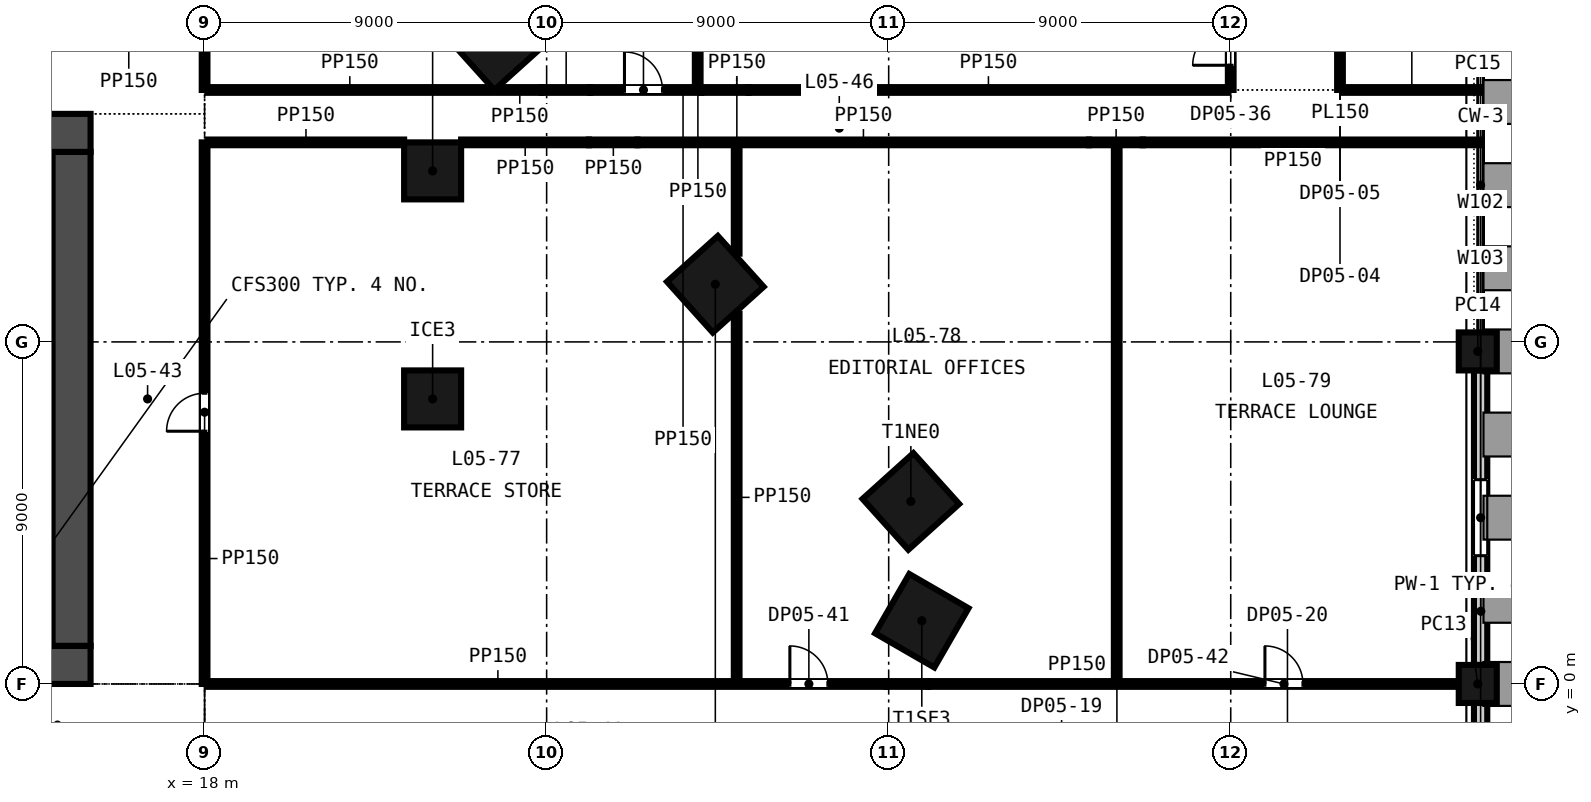
"""IFC4 building model, lengths in metres.
Left out: names, types, materials, properties, quantities, classifications, styles, units other than length and angle.
Written with IfcOpenShell. Run it as: python <this file> out.ifc"""

import sys

from ifc_helpers import new_model, si_unit, direction, frame, frame_2d, origin, origin_2d, place, context, subcontext, project, spatial, rectangle, extrude, element, fill, save


model = new_model("IFC4")
c1 = context("Model", 3, precision=1e-05, world=origin(), true_north=direction((0.0, 1.0)))
c2 = subcontext(c1, "Body", "Model", "MODEL_VIEW")
j1 = project(units=[si_unit("LENGTHUNIT", "METRE"), si_unit("PLANEANGLEUNIT", "RADIAN")], contexts=[c1])
p1 = place(None, origin())
s1 = spatial("IfcSite", under=j1, at=p1, CompositionType="ELEMENT")
p2 = place(p1, origin())
s2 = spatial("IfcBuilding", under=s1, at=p2, CompositionType="ELEMENT")
p3 = place(p2, frame((0.0, 0.0, 31.5)))
s3 = spatial("IfcBuildingStorey", under=s2, at=p3, CompositionType="ELEMENT", Elevation=31.5)
p4 = place(p3, frame((-15.0, 0.5, -0.3), z_axis=(0.0, 0.0, 1.0), x_axis=(1.0, 0.0, 0.0)))
e1 = element("IfcWall", 1, at=p4, inside=s3, PredefinedType="SOLIDWALL", context=c2, shape_type="SweptSolid", body=[
    extrude(rectangle(XDim=30.0, YDim=1.0, at=frame_2d((15.0, 0.0))), origin(), (0.0, 0.0, 1.0), 4.65),
])
p5 = place(p4, frame((5.8, 0.0, 0.3)))
e2 = element("IfcOpeningElement", 2, at=p5, cuts=e1, PredefinedType="OPENING", context=c2, shape_type="SweptSolid", body=[
    extrude(rectangle(XDim=2.4, YDim=2.4, at=frame_2d((1.2, 1.2))), frame((0.0, 0.51, 0.0), z_axis=(0.0, -1.0, 0.0), x_axis=(1.0, 0.0, 0.0)), (0.0, 0.0, 1.0), 1.02),
])
p6 = place(p4, frame((13.8, 0.0, 0.3)))
e3 = element("IfcOpeningElement", 3, at=p6, cuts=e1, PredefinedType="OPENING", context=c2, shape_type="SweptSolid", body=[
    extrude(rectangle(XDim=2.4, YDim=2.4, at=frame_2d((1.2, 1.2))), frame((0.0, 0.51, 0.0), z_axis=(0.0, -1.0, 0.0), x_axis=(1.0, 0.0, 0.0)), (0.0, 0.0, 1.0), 1.02),
])
p7 = place(p4, frame((21.8, 0.0, 0.3)))
e4 = element("IfcOpeningElement", 4, at=p7, cuts=e1, PredefinedType="OPENING", context=c2, shape_type="SweptSolid", body=[
    extrude(rectangle(XDim=2.4, YDim=2.4, at=frame_2d((1.2, 1.2))), frame((0.0, 0.51, 0.0), z_axis=(0.0, -1.0, 0.0), x_axis=(1.0, 0.0, 0.0)), (0.0, 0.0, 1.0), 1.02),
])
p8 = place(p4, frame((1.5, 0.0, 0.3)))
e5 = element("IfcOpeningElement", 5, at=p8, cuts=e1, PredefinedType="OPENING", context=c2, shape_type="SweptSolid", body=[
    extrude(rectangle(XDim=1.2, YDim=2.1, at=frame_2d((0.6, 1.05))), frame((0.0, 0.51, 0.0), z_axis=(0.0, -1.0, 0.0), x_axis=(1.0, 0.0, 0.0)), (0.0, 0.0, 1.0), 1.02),
])
p9 = place(p4, frame((27.3, 0.0, 0.3)))
e6 = element("IfcOpeningElement", 6, at=p9, cuts=e1, PredefinedType="OPENING", context=c2, shape_type="SweptSolid", body=[
    extrude(rectangle(XDim=1.2, YDim=2.1, at=frame_2d((0.6, 1.05))), frame((0.0, 0.51, 0.0), z_axis=(0.0, -1.0, 0.0), x_axis=(1.0, 0.0, 0.0)), (0.0, 0.0, 1.0), 1.02),
])
p10 = place(p3, frame((-15.0, 14.5, -0.3), z_axis=(0.0, 0.0, 1.0), x_axis=(1.0, 0.0, 0.0)))
e7 = element("IfcWall", 7, at=p10, inside=s3, PredefinedType="SOLIDWALL", context=c2, shape_type="SweptSolid", body=[
    extrude(rectangle(XDim=30.0, YDim=1.0, at=frame_2d((15.0, 0.0))), origin(), (0.0, 0.0, 1.0), 4.65),
])
p11 = place(p10, frame((9.25, 0.0, 0.3)))
e8 = element("IfcOpeningElement", 8, at=p11, cuts=e7, PredefinedType="OPENING", context=c2, shape_type="SweptSolid", body=[
    extrude(rectangle(XDim=1.5, YDim=2.1, at=frame_2d((0.75, 1.05))), frame((0.0, 0.51, 0.0), z_axis=(0.0, -1.0, 0.0), x_axis=(1.0, 0.0, 0.0)), (0.0, 0.0, 1.0), 1.02),
])
p12 = place(p10, frame((19.4, 0.0, 0.3)))
e9 = element("IfcOpeningElement", 9, at=p12, cuts=e7, PredefinedType="OPENING", context=c2, shape_type="SweptSolid", body=[
    extrude(rectangle(XDim=1.5, YDim=2.1, at=frame_2d((0.75, 1.05))), frame((0.0, 0.51, 0.0), z_axis=(0.0, -1.0, 0.0), x_axis=(1.0, 0.0, 0.0)), (0.0, 0.0, 1.0), 1.02),
])
p13 = place(p10, frame((1.5, 0.0, 0.3)))
e10 = element("IfcOpeningElement", 10, at=p13, cuts=e7, PredefinedType="OPENING", context=c2, shape_type="SweptSolid", body=[
    extrude(rectangle(XDim=1.2, YDim=2.1, at=frame_2d((0.6, 1.05))), frame((0.0, 0.51, 0.0), z_axis=(0.0, -1.0, 0.0), x_axis=(1.0, 0.0, 0.0)), (0.0, 0.0, 1.0), 1.02),
])
p14 = place(p10, frame((27.3, 0.0, 0.3)))
e11 = element("IfcOpeningElement", 11, at=p14, cuts=e7, PredefinedType="OPENING", context=c2, shape_type="SweptSolid", body=[
    extrude(rectangle(XDim=1.2, YDim=2.1, at=frame_2d((0.6, 1.05))), frame((0.0, 0.51, 0.0), z_axis=(0.0, -1.0, 0.0), x_axis=(1.0, 0.0, 0.0)), (0.0, 0.0, 1.0), 1.02),
])
p15 = place(p3, frame((14.5, 1.0, -0.3), z_axis=(0.0, 0.0, 1.0), x_axis=(0.0, 1.0, 0.0)))
e12 = element("IfcWall", 12, at=p15, inside=s3, PredefinedType="SOLIDWALL", context=c2, shape_type="SweptSolid", body=[
    extrude(rectangle(XDim=13.0, YDim=1.0, at=frame_2d((6.5, 0.0))), origin(), (0.0, 0.0, 1.0), 4.65),
])
for number, where, z_axis, x_axis in (
    (13, (36.872, 1.663, -0.3), (0.0, 0.0, 1.0), (0.5, 0.866, 0.0)),
    (14, (36.584, 4.803, -0.3), (0.0, 0.0, 1.0), (-0.669, 0.743, 0.0)),
    (15, (31.438, 10.517, -0.3), (0.0, 0.0, 1.0), (-0.669, 0.743, 0.0)),
    (16, (25.691, 16.9, -0.3), (0.0, 0.0, 1.0), (-0.669, 0.743, 0.0)),
):
    element("IfcColumn", number, at=place(p3, frame(where, z_axis=z_axis, x_axis=x_axis)), inside=s3, PredefinedType="COLUMN", context=c2, shape_type="SweptSolid", body=[
        extrude(rectangle(XDim=1.8, YDim=1.8, at=origin_2d()), origin(), (0.0, 0.0, 1.0), 4.65),
    ])
for number, where, z_axis, x_axis in (
    (17, (24.0, 7.5, -0.3), (0.0, 0.0, 1.0), (1.0, 0.0, 0.0)),
    (18, (24.0, 13.5, -0.3), (0.0, 0.0, 1.0), (1.0, 0.0, 0.0)),
):
    element("IfcColumn", number, at=place(p3, frame(where, z_axis=z_axis, x_axis=x_axis)), inside=s3, PredefinedType="COLUMN", context=c2, shape_type="SweptSolid", body=[
        extrude(rectangle(XDim=1.5, YDim=1.5, at=origin_2d()), origin(), (0.0, 0.0, 1.0), 4.65),
    ])
for number, where, z_axis, x_axis in (
    (19, (51.5, 0.0, -0.3), (0.0, 0.0, 1.0), (0.0, 1.0, 0.0)),
    (20, (51.5, 8.75, -0.3), (0.0, 0.0, 1.0), (0.0, 1.0, 0.0)),
):
    element("IfcColumn", number, at=place(p3, frame(where, z_axis=z_axis, x_axis=x_axis)), inside=s3, PredefinedType="COLUMN", context=c2, shape_type="SweptSolid", body=[
        extrude(rectangle(XDim=1.0, YDim=1.0, at=origin_2d()), origin(), (0.0, 0.0, 1.0), 4.65),
    ])
p16 = place(p3, frame((51.575, -8.2, -0.3), z_axis=(0.0, 0.0, 1.0), x_axis=(0.0, 1.0, 0.0)))
e21 = element("IfcWall", 21, at=p16, inside=s3, PredefinedType="SOLIDWALL", context=c2, shape_type="SweptSolid", body=[
    extrude(rectangle(XDim=7.7, YDim=0.35, at=frame_2d((3.85, 0.0))), origin(), (0.0, 0.0, 1.0), 3.75),
])
p17 = place(p16, frame((2.85, 0.0, 1.2)))
e22 = element("IfcOpeningElement", 22, at=p17, cuts=e21, PredefinedType="OPENING", context=c2, shape_type="SweptSolid", body=[
    extrude(rectangle(XDim=2.0, YDim=2.5, at=frame_2d((1.0, 1.25))), frame((0.0, 0.185, 0.0), z_axis=(0.0, -1.0, 0.0), x_axis=(1.0, 0.0, 0.0)), (0.0, 0.0, 1.0), 0.37),
])
p18 = place(p3, frame((51.575, 0.5, -0.3), z_axis=(0.0, 0.0, 1.0), x_axis=(0.0, 1.0, 0.0)))
e23 = element("IfcWall", 23, at=p18, inside=s3, PredefinedType="SOLIDWALL", context=c2, shape_type="SweptSolid", body=[
    extrude(rectangle(XDim=7.75, YDim=0.35, at=frame_2d((3.875, 0.0))), origin(), (0.0, 0.0, 1.0), 3.75),
])
p19 = place(p18, frame((2.875, 0.0, 1.2)))
e24 = element("IfcOpeningElement", 24, at=p19, cuts=e23, PredefinedType="OPENING", context=c2, shape_type="SweptSolid", body=[
    extrude(rectangle(XDim=2.0, YDim=2.5, at=frame_2d((1.0, 1.25))), frame((0.0, 0.185, 0.0), z_axis=(0.0, -1.0, 0.0), x_axis=(1.0, 0.0, 0.0)), (0.0, 0.0, 1.0), 0.37),
])
p20 = place(p3, frame((11.05, 7.35, -0.3), z_axis=(0.0, 0.0, 1.0), x_axis=(1.0, 0.0, 0.0)))
e25 = element("IfcWall", 25, at=p20, inside=s3, PredefinedType="SOLIDWALL", context=c2, shape_type="SweptSolid", body=[
    extrude(rectangle(XDim=2.95, YDim=0.3, at=frame_2d((1.475, 0.0))), origin(), (0.0, 0.0, 1.0), 4.65),
])
p21 = place(p3, frame((18.075, 0.0, 0.0), z_axis=(0.0, 0.0, 1.0), x_axis=(1.0, 0.0, 0.0)))
e26 = element("IfcWall", 26, at=p21, inside=s3, PredefinedType="PARTITIONING", context=c2, shape_type="SweptSolid", body=[
    extrude(rectangle(XDim=17.865, YDim=0.15, at=frame_2d((8.933, 0.0))), origin(), (0.0, 0.0, 1.0), 4.35),
])
p22 = place(p21, frame((15.325, 0.0, 0.0)))
e27 = element("IfcOpeningElement", 27, at=p22, cuts=e26, PredefinedType="OPENING", context=c2, shape_type="SweptSolid", body=[
    extrude(rectangle(XDim=1.0, YDim=2.1, at=frame_2d((0.5, 1.05))), frame((0.0, 0.085, 0.0), z_axis=(0.0, -1.0, 0.0), x_axis=(1.0, 0.0, 0.0)), (0.0, 0.0, 1.0), 0.17),
])
p23 = place(p3, frame((35.94, 0.0, 0.0), z_axis=(0.0, 0.0, 1.0), x_axis=(1.0, 0.0, 0.0)))
e28 = element("IfcWall", 28, at=p23, inside=s3, PredefinedType="PARTITIONING", context=c2, shape_type="SweptSolid", body=[
    extrude(rectangle(XDim=1.097, YDim=0.15, at=frame_2d((0.548, 0.0))), origin(), (0.0, 0.0, 1.0), 3.5),
])
p24 = place(p3, frame((37.037, 0.0, 0.0), z_axis=(0.0, 0.0, 1.0), x_axis=(1.0, 0.0, 0.0)))
e29 = element("IfcWall", 29, at=p24, inside=s3, PredefinedType="PARTITIONING", context=c2, shape_type="SweptSolid", body=[
    extrude(rectangle(XDim=13.963, YDim=0.15, at=frame_2d((6.981, 0.0))), origin(), (0.0, 0.0, 1.0), 4.35),
])
p25 = place(p24, frame((8.863, 0.0, 0.0)))
e30 = element("IfcOpeningElement", 30, at=p25, cuts=e29, PredefinedType="OPENING", context=c2, shape_type="SweptSolid", body=[
    extrude(rectangle(XDim=1.0, YDim=2.1, at=frame_2d((0.5, 1.05))), frame((0.0, 0.085, 0.0), z_axis=(0.0, -1.0, 0.0), x_axis=(1.0, 0.0, 0.0)), (0.0, 0.0, 1.0), 0.17),
])
p26 = place(p3, frame((18.075, 14.25, 0.0), z_axis=(0.0, 0.0, 1.0), x_axis=(1.0, 0.0, 0.0)))
e31 = element("IfcWall", 31, at=p26, inside=s3, PredefinedType="PARTITIONING", context=c2, shape_type="SweptSolid", body=[
    extrude(rectangle(XDim=5.175, YDim=0.15, at=frame_2d((2.587, 0.0))), origin(), (0.0, 0.0, 1.0), 4.35),
])
p27 = place(p3, frame((24.75, 14.25, 0.0), z_axis=(0.0, 0.0, 1.0), x_axis=(1.0, 0.0, 0.0)))
e32 = element("IfcWall", 32, at=p27, inside=s3, PredefinedType="PARTITIONING", context=c2, shape_type="SweptSolid", body=[
    extrude(rectangle(XDim=3.361, YDim=0.15, at=frame_2d((1.681, 0.0))), origin(), (0.0, 0.0, 1.0), 4.35),
])
p28 = place(p3, frame((28.111, 14.25, 0.0), z_axis=(0.0, 0.0, 1.0), x_axis=(1.0, 0.0, 0.0)))
e33 = element("IfcWall", 33, at=p28, inside=s3, PredefinedType="PARTITIONING", context=c2, shape_type="SweptSolid", body=[
    extrude(rectangle(XDim=1.278, YDim=0.15, at=frame_2d((0.639, 0.0))), origin(), (0.0, 0.0, 1.0), 3.5),
])
p29 = place(p3, frame((29.389, 14.25, 0.0), z_axis=(0.0, 0.0, 1.0), x_axis=(1.0, 0.0, 0.0)))
e34 = element("IfcWall", 34, at=p29, inside=s3, PredefinedType="PARTITIONING", context=c2, shape_type="SweptSolid", body=[
    extrude(rectangle(XDim=11.882, YDim=0.15, at=frame_2d((5.941, 0.0))), origin(), (0.0, 0.0, 1.0), 4.35),
])
p30 = place(p3, frame((41.272, 14.25, 0.0), z_axis=(0.0, 0.0, 1.0), x_axis=(1.0, 0.0, 0.0)))
e35 = element("IfcWall", 35, at=p30, inside=s3, PredefinedType="PARTITIONING", context=c2, shape_type="SweptSolid", body=[
    extrude(rectangle(XDim=1.415, YDim=0.15, at=frame_2d((0.708, 0.0))), origin(), (0.0, 0.0, 1.0), 3.436),
])
p31 = place(p3, frame((42.687, 14.25, 0.0), z_axis=(0.0, 0.0, 1.0), x_axis=(1.0, 0.0, 0.0)))
e36 = element("IfcWall", 36, at=p31, inside=s3, PredefinedType="PARTITIONING", context=c2, shape_type="SweptSolid", body=[
    extrude(rectangle(XDim=8.884, YDim=0.15, at=frame_2d((4.442, 0.0))), origin(), (0.0, 0.0, 1.0), 4.35),
])
p32 = place(p3, frame((18.075, 15.629, 0.0), z_axis=(0.0, 0.0, 1.0), x_axis=(1.0, 0.0, 0.0)))
e37 = element("IfcWall", 37, at=p32, inside=s3, PredefinedType="PARTITIONING", context=c2, shape_type="SweptSolid", body=[
    extrude(rectangle(XDim=7.482, YDim=0.15, at=frame_2d((3.741, 0.0))), origin(), (0.0, 0.0, 1.0), 4.35),
])
p33 = place(p3, frame((25.708, 15.629, 0.0), z_axis=(0.0, 0.0, 1.0), x_axis=(1.0, 0.0, 0.0)))
e38 = element("IfcWall", 38, at=p33, inside=s3, PredefinedType="PARTITIONING", context=c2, shape_type="SweptSolid", body=[
    extrude(rectangle(XDim=1.162, YDim=0.15, at=frame_2d((0.581, 0.0))), origin(), (0.0, 0.0, 1.0), 4.35),
])
p34 = place(p3, frame((26.869, 15.629, 0.0), z_axis=(0.0, 0.0, 1.0), x_axis=(1.0, 0.0, 0.0)))
e39 = element("IfcWall", 39, at=p34, inside=s3, PredefinedType="PARTITIONING", context=c2, shape_type="SweptSolid", body=[
    extrude(rectangle(XDim=1.278, YDim=0.15, at=frame_2d((0.639, 0.0))), origin(), (0.0, 0.0, 1.0), 3.5),
])
p35 = place(p3, frame((28.148, 15.629, 0.0), z_axis=(0.0, 0.0, 1.0), x_axis=(1.0, 0.0, 0.0)))
e40 = element("IfcWall", 40, at=p35, inside=s3, PredefinedType="PARTITIONING", context=c2, shape_type="SweptSolid", body=[
    extrude(rectangle(XDim=2.923, YDim=0.15, at=frame_2d((1.461, 0.0))), origin(), (0.0, 0.0, 1.0), 4.35),
])
p36 = place(p35, frame((0.9, 0.0, 0.0)))
e41 = element("IfcOpeningElement", 41, at=p36, cuts=e40, PredefinedType="OPENING", context=c2, shape_type="SweptSolid", body=[
    extrude(rectangle(XDim=1.0, YDim=2.1, at=frame_2d((0.5, 1.05))), frame((0.0, 0.085, 0.0), z_axis=(0.0, -1.0, 0.0), x_axis=(1.0, 0.0, 0.0)), (0.0, 0.0, 1.0), 0.17),
])
p37 = place(p3, frame((31.071, 15.629, 0.0), z_axis=(0.0, 0.0, 1.0), x_axis=(1.0, 0.0, 0.0)))
e42 = element("IfcWall", 42, at=p37, inside=s3, PredefinedType="PARTITIONING", context=c2, shape_type="SweptSolid", body=[
    extrude(rectangle(XDim=1.243, YDim=0.15, at=frame_2d((0.622, 0.0))), origin(), (0.0, 0.0, 1.0), 3.261),
])
p38 = place(p3, frame((32.314, 15.629, 0.0), z_axis=(0.0, 0.0, 1.0), x_axis=(1.0, 0.0, 0.0)))
e43 = element("IfcWall", 43, at=p38, inside=s3, PredefinedType="PARTITIONING", context=c2, shape_type="SweptSolid", body=[
    extrude(rectangle(XDim=12.611, YDim=0.15, at=frame_2d((6.305, 0.0))), origin(), (0.0, 0.0, 1.0), 4.35),
])
p39 = place(p3, frame((47.95, 15.629, 0.0), z_axis=(0.0, 0.0, 1.0), x_axis=(1.0, 0.0, 0.0)))
e44 = element("IfcWall", 44, at=p39, inside=s3, PredefinedType="PARTITIONING", context=c2, shape_type="SweptSolid", body=[
    extrude(rectangle(XDim=3.62, YDim=0.15, at=frame_2d((1.81, 0.0))), origin(), (0.0, 0.0, 1.0), 4.35),
])
p40 = place(p3, frame((18.0, 0.0, 0.0), z_axis=(0.0, 0.0, 1.0), x_axis=(0.0, 1.0, 0.0)))
e45 = element("IfcWall", 45, at=p40, inside=s3, PredefinedType="PARTITIONING", context=c2, shape_type="SweptSolid", body=[
    extrude(rectangle(XDim=14.25, YDim=0.15, at=frame_2d((7.125, 0.0))), origin(), (0.0, 0.0, 1.0), 4.35),
])
p41 = place(p40, frame((6.65, 0.0, 0.0)))
e46 = element("IfcOpeningElement", 46, at=p41, cuts=e45, PredefinedType="OPENING", context=c2, shape_type="SweptSolid", body=[
    extrude(rectangle(XDim=1.0, YDim=2.1, at=frame_2d((0.5, 1.05))), frame((0.0, 0.085, 0.0), z_axis=(0.0, -1.0, 0.0), x_axis=(1.0, 0.0, 0.0)), (0.0, 0.0, 1.0), 0.17),
])
p42 = place(p3, frame((18.0, 15.629, 0.0), z_axis=(0.0, 0.0, 1.0), x_axis=(0.0, 1.0, 0.0)))
e47 = element("IfcWall", 47, at=p42, inside=s3, PredefinedType="PARTITIONING", context=c2, shape_type="SweptSolid", body=[
    extrude(rectangle(XDim=9.85, YDim=0.15, at=frame_2d((4.925, 0.0))), origin(), (0.0, 0.0, 1.0), 4.35),
])
p43 = place(p3, frame((32.0, 0.075, 0.0), z_axis=(0.0, 0.0, 1.0), x_axis=(0.0, 1.0, 0.0)))
e48 = element("IfcWall", 48, at=p43, inside=s3, PredefinedType="PARTITIONING", context=c2, shape_type="SweptSolid", body=[
    extrude(rectangle(XDim=9.669, YDim=0.15, at=frame_2d((4.834, 0.0))), origin(), (0.0, 0.0, 1.0), 4.35),
])
p44 = place(p3, frame((32.0, 11.322, 0.0), z_axis=(0.0, 0.0, 1.0), x_axis=(0.0, 1.0, 0.0)))
e49 = element("IfcWall", 49, at=p44, inside=s3, PredefinedType="PARTITIONING", context=c2, shape_type="SweptSolid", body=[
    extrude(rectangle(XDim=2.853, YDim=0.15, at=frame_2d((1.427, 0.0))), origin(), (0.0, 0.0, 1.0), 4.35),
])
p45 = place(p3, frame((30.975, 15.704, 0.0), z_axis=(0.0, 0.0, 1.0), x_axis=(0.0, 1.0, 0.0)))
e50 = element("IfcWall", 50, at=p45, inside=s3, PredefinedType="PARTITIONING", context=c2, shape_type="SweptSolid", body=[
    extrude(rectangle(XDim=4.493, YDim=0.15, at=frame_2d((2.246, 0.0))), origin(), (0.0, 0.0, 1.0), 4.35),
])
p46 = place(p3, frame((42.0, 0.075, 0.0), z_axis=(0.0, 0.0, 1.0), x_axis=(0.0, 1.0, 0.0)))
e51 = element("IfcWall", 51, at=p46, inside=s3, PredefinedType="PARTITIONING", context=c2, shape_type="SweptSolid", body=[
    extrude(rectangle(XDim=14.1, YDim=0.15, at=frame_2d((7.05, 0.0))), origin(), (0.0, 0.0, 1.0), 4.35),
])
p47 = place(p3, frame((45.0, 15.629, 0.0), z_axis=(0.0, 0.0, 1.0), x_axis=(0.0, 1.0, 0.0)))
e52 = element("IfcWall", 52, at=p47, inside=s3, PredefinedType="PARTITIONING", context=c2, shape_type="SweptSolid", body=[
    extrude(rectangle(XDim=6.062, YDim=0.15, at=frame_2d((3.031, 0.0))), origin(), (0.0, 0.0, 1.0), 4.35),
])
p48 = place(p47, frame((0.65, 0.0, 0.0)))
e53 = element("IfcOpeningElement", 53, at=p48, cuts=e52, PredefinedType="OPENING", context=c2, shape_type="SweptSolid", body=[
    extrude(rectangle(XDim=1.0, YDim=2.1, at=frame_2d((0.5, 1.05))), frame((0.0, 0.085, 0.0), z_axis=(0.0, -1.0, 0.0), x_axis=(1.0, 0.0, 0.0)), (0.0, 0.0, 1.0), 0.17),
])
p49 = place(p3, frame((47.875, 15.629, 0.0), z_axis=(0.0, 0.0, 1.0), x_axis=(0.0, 1.0, 0.0)))
e54 = element("IfcWall", 54, at=p49, inside=s3, PredefinedType="PARTITIONING", context=c2, shape_type="SweptSolid", body=[
    extrude(rectangle(XDim=7.48, YDim=0.15, at=frame_2d((3.74, 0.0))), origin(), (0.0, 0.0, 1.0), 4.35),
])
p50 = place(p49, frame((6.021, 0.0, 0.0)))
e55 = element("IfcOpeningElement", 55, at=p50, cuts=e54, PredefinedType="OPENING", context=c2, shape_type="SweptSolid", body=[
    extrude(rectangle(XDim=0.9, YDim=2.1, at=frame_2d((0.45, 1.05))), frame((0.0, 0.085, 0.0), z_axis=(0.0, -1.0, 0.0), x_axis=(1.0, 0.0, 0.0)), (0.0, 0.0, 1.0), 0.17),
])
p51 = place(p19, origin())
e56 = element("IfcWindow", 56, at=p51, inside=s3, PartitioningType="SINGLE_PANEL", PredefinedType="WINDOW", context=c2, shape_type="SweptSolid", body=[
    extrude(rectangle(XDim=2.0, YDim=2.5, at=frame_2d((1.0, 1.25))), frame((0.0, 0.03, 0.0), z_axis=(0.0, -1.0, 0.0), x_axis=(1.0, 0.0, 0.0)), (0.0, 0.0, 1.0), 0.06),
])
fill(e24, e56)
p52 = place(p36, origin())
e57 = element("IfcDoor", 57, at=p52, inside=s3, OperationType="SINGLE_SWING_LEFT", PredefinedType="DOOR", context=c2, shape_type="SweptSolid", body=[
    extrude(rectangle(XDim=1.0, YDim=2.1, at=frame_2d((0.5, 1.05))), frame((0.0, 0.025, 0.0), z_axis=(0.0, -1.0, 0.0), x_axis=(1.0, 0.0, 0.0)), (0.0, 0.0, 1.0), 0.05),
])
fill(e41, e57)
p53 = place(p48, origin())
e58 = element("IfcDoor", 58, at=p53, inside=s3, OperationType="SINGLE_SWING_LEFT", PredefinedType="DOOR", context=c2, shape_type="SweptSolid", body=[
    extrude(rectangle(XDim=1.0, YDim=2.1, at=frame_2d((0.5, 1.05))), frame((0.0, 0.025, 0.0), z_axis=(0.0, -1.0, 0.0), x_axis=(1.0, 0.0, 0.0)), (0.0, 0.0, 1.0), 0.05),
])
fill(e53, e58)
p54 = place(p41, origin())
e59 = element("IfcDoor", 59, at=p54, inside=s3, OperationType="SINGLE_SWING_LEFT", PredefinedType="DOOR", context=c2, shape_type="SweptSolid", body=[
    extrude(rectangle(XDim=1.0, YDim=2.1, at=frame_2d((0.5, 1.05))), frame((0.0, 0.025, 0.0), z_axis=(0.0, -1.0, 0.0), x_axis=(1.0, 0.0, 0.0)), (0.0, 0.0, 1.0), 0.05),
])
fill(e46, e59)
p55 = place(p22, origin())
e60 = element("IfcDoor", 60, at=p55, inside=s3, OperationType="SINGLE_SWING_LEFT", PredefinedType="DOOR", context=c2, shape_type="SweptSolid", body=[
    extrude(rectangle(XDim=1.0, YDim=2.1, at=frame_2d((0.5, 1.05))), frame((0.0, 0.025, 0.0), z_axis=(0.0, -1.0, 0.0), x_axis=(1.0, 0.0, 0.0)), (0.0, 0.0, 1.0), 0.05),
])
fill(e27, e60)
p56 = place(p25, origin())
e61 = element("IfcDoor", 61, at=p56, inside=s3, OperationType="SINGLE_SWING_LEFT", PredefinedType="DOOR", context=c2, shape_type="SweptSolid", body=[
    extrude(rectangle(XDim=1.0, YDim=2.1, at=frame_2d((0.5, 1.05))), frame((0.0, 0.025, 0.0), z_axis=(0.0, -1.0, 0.0), x_axis=(1.0, 0.0, 0.0)), (0.0, 0.0, 1.0), 0.05),
])
fill(e30, e61)
save(model, sys.argv[1])
